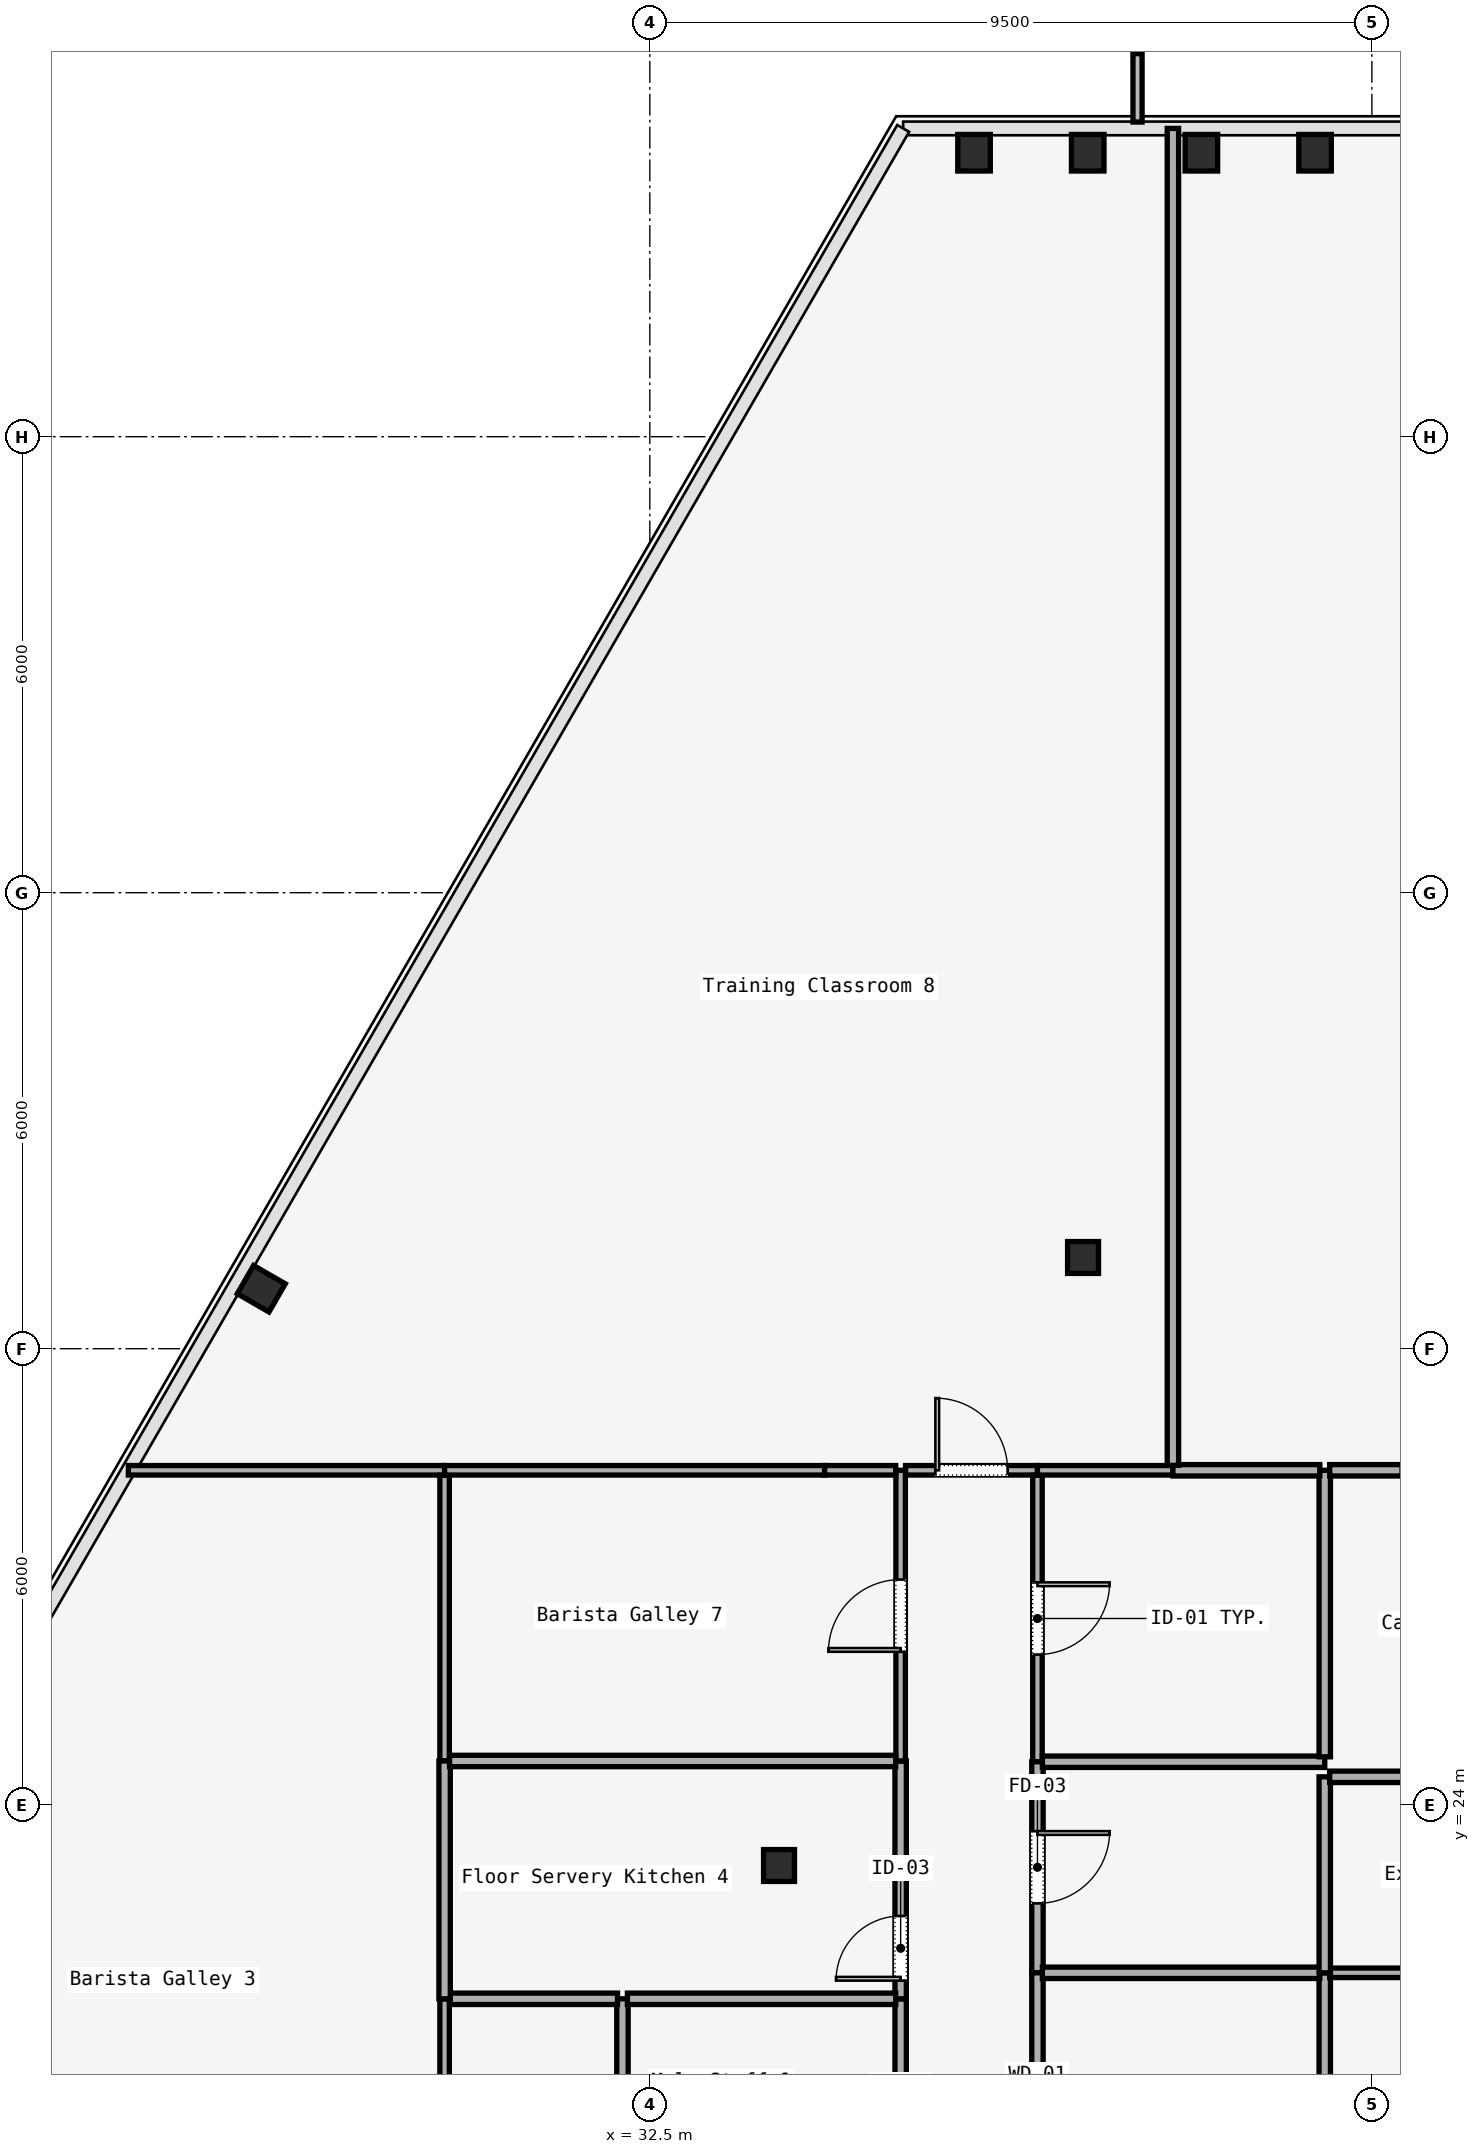
"""IFC4 building model, lengths in metres.
Left out: names, types, materials, properties, quantities, classifications, styles, units other than length and angle.
Written with IfcOpenShell. Run it as: python <this file> out.ifc"""

import sys

from ifc_helpers import new_model, si_unit, direction, frame, frame_2d, origin, origin_2d, place, context, subcontext, project, spatial, rectangle, i_section, extrude, element, fill, save


model = new_model("IFC4")
c1 = context("Model", 3, precision=1e-05, world=origin(), true_north=direction((0.0, 1.0)))
c2 = subcontext(c1, "Body", "Model", "MODEL_VIEW")
j1 = project(units=[si_unit("LENGTHUNIT", "METRE"), si_unit("PLANEANGLEUNIT", "RADIAN")], contexts=[c1])
p1 = place(None, origin())
s1 = spatial("IfcSite", under=j1, at=p1, CompositionType="ELEMENT")
p2 = place(p1, origin())
s2 = spatial("IfcBuilding", under=s1, at=p2, CompositionType="ELEMENT")
p3 = place(p2, frame((0.0, 0.0, 134.6)))
s3 = spatial("IfcBuildingStorey", under=s2, at=p3, CompositionType="ELEMENT", Elevation=134.6)
for number, where, z_axis, x_axis in (
    (1, (34.2, 23.2, 0.0), (0.0, 0.0, 1.0), (1.0, 0.0, 0.0)),
    (2, (38.2, 31.2, 0.0), (0.0, 0.0, 1.0), (1.0, 0.0, 0.0)),
):
    element("IfcColumn", number, at=place(p3, frame(where, z_axis=z_axis, x_axis=x_axis)), inside=s3, PredefinedType="COLUMN", context=c2, shape_type="SweptSolid", body=[
        extrude(i_section(OverallWidth=0.407, OverallDepth=0.419, WebThickness=0.031, FlangeThickness=0.049, FilletRadius=0.015, at=origin_2d()), origin(), (0.0, 0.0, 1.0), 3.58),
    ])
p4 = place(p3, frame((41.252, 45.736, 0.0), z_axis=(0.010023797531, 0.01363781977, 0.999856756418), x_axis=(-0.805764103538, 0.5922366161, 0.0)))
e3 = element("IfcColumn", 3, at=p4, inside=s3, PredefinedType="COLUMN", context=c2, shape_type="SweptSolid", body=[
    extrude(i_section(OverallWidth=0.428, OverallDepth=0.481, WebThickness=0.051, FlangeThickness=0.065, FilletRadius=0.015, at=origin_2d()), origin(), (0.0, 0.0, 1.0), 3.58),
])
p5 = place(p3, frame((39.757, 45.736, 0.0), z_axis=(0.03012741391, 0.013632313987, 0.999453099923), x_axis=(-0.412249348078, 0.911071059253, 0.0)))
e4 = element("IfcColumn", 4, at=p5, inside=s3, PredefinedType="COLUMN", context=c2, shape_type="SweptSolid", body=[
    extrude(i_section(OverallWidth=0.428, OverallDepth=0.481, WebThickness=0.051, FlangeThickness=0.065, FilletRadius=0.015, at=origin_2d()), origin(), (0.0, 0.0, 1.0), 3.582),
])
p6 = place(p3, frame((38.261, 45.736, 0.0), z_axis=(0.050126603366, 0.01362135961, 0.998649979821), x_axis=(-0.262229747612, 0.965005471211, 0.0)))
e5 = element("IfcColumn", 5, at=p6, inside=s3, PredefinedType="COLUMN", context=c2, shape_type="SweptSolid", body=[
    extrude(i_section(OverallWidth=0.428, OverallDepth=0.481, WebThickness=0.051, FlangeThickness=0.065, FilletRadius=0.015, at=origin_2d()), origin(), (0.0, 0.0, 1.0), 3.585),
])
p7 = place(p3, frame((36.766, 45.736, 0.0), z_axis=(0.070065681514, 0.013604986702, 0.997449600035), x_axis=(-0.190614555111, 0.981664958822, 0.0)))
e6 = element("IfcColumn", 6, at=p7, inside=s3, PredefinedType="COLUMN", context=c2, shape_type="SweptSolid", body=[
    extrude(i_section(OverallWidth=0.428, OverallDepth=0.481, WebThickness=0.051, FlangeThickness=0.065, FilletRadius=0.015, at=origin_2d()), origin(), (0.0, 0.0, 1.0), 3.589),
])
p8 = place(p3, frame((27.388, 30.789, 0.0), z_axis=(0.03605116615, -0.062511361682, 0.997392923115), x_axis=(0.001605432576, 0.998044039557, 0.062494141246)))
e7 = element("IfcColumn", 7, at=p8, inside=s3, PredefinedType="COLUMN", context=c2, shape_type="SweptSolid", body=[
    extrude(i_section(OverallWidth=0.428, OverallDepth=0.481, WebThickness=0.051, FlangeThickness=0.065, FilletRadius=0.015, at=origin_2d()), origin(), (0.0, 0.0, 1.0), 3.589),
])
p9 = place(p3, frame((35.8, 17.065, 0.0), z_axis=(0.0, 0.0, 1.0), x_axis=(0.0, 1.0, 0.0)))
e8 = element("IfcWall", 8, at=p9, inside=s3, PredefinedType="PARTITIONING", context=c2, shape_type="SweptSolid", body=[
    extrude(rectangle(XDim=4.381, YDim=0.15, at=frame_2d((2.19, 0.0))), origin(), (0.0, 0.0, 1.0), 3.01),
])
p10 = place(p9, frame((1.74, 0.0, 0.0)))
e9 = element("IfcOpeningElement", 9, at=p10, cuts=e8, PredefinedType="OPENING", context=c2, shape_type="SweptSolid", body=[
    extrude(rectangle(XDim=0.9, YDim=2.15, at=frame_2d((0.45, 1.075))), frame((0.0, 0.075, 0.0), z_axis=(0.0, -1.0, 0.0), x_axis=(1.0, 0.0, 0.0)), (0.0, 0.0, 1.0), 0.15),
])
p11 = place(p3, frame((35.8, 21.446, 0.0), z_axis=(0.0, 0.0, 1.0), x_axis=(0.0, 1.0, 0.0)))
e10 = element("IfcWall", 10, at=p11, inside=s3, PredefinedType="PARTITIONING", context=c2, shape_type="SweptSolid", body=[
    extrude(rectangle(XDim=3.129, YDim=0.15, at=frame_2d((1.564, 0.0))), origin(), (0.0, 0.0, 1.0), 3.01),
])
p12 = place(p11, frame((0.24, 0.0, 0.0)))
e11 = element("IfcOpeningElement", 11, at=p12, cuts=e10, PredefinedType="OPENING", context=c2, shape_type="SweptSolid", body=[
    extrude(rectangle(XDim=0.85, YDim=2.15, at=frame_2d((0.425, 1.075))), frame((0.0, 0.075, 0.0), z_axis=(0.0, -1.0, 0.0), x_axis=(1.0, 0.0, 0.0)), (0.0, 0.0, 1.0), 0.15),
])
p13 = place(p3, frame((35.8, 24.575, 0.0), z_axis=(0.0, 0.0, 1.0), x_axis=(0.0, 1.0, 0.0)))
e12 = element("IfcWall", 12, at=p13, inside=s3, PredefinedType="PARTITIONING", context=c2, shape_type="SweptSolid", body=[
    extrude(rectangle(XDim=3.825, YDim=0.125, at=frame_2d((1.912, 0.0))), origin(), (0.0, 0.0, 1.0), 3.01),
])
p14 = place(p13, frame((1.437, 0.0, 0.0)))
e13 = element("IfcOpeningElement", 13, at=p14, cuts=e12, PredefinedType="OPENING", context=c2, shape_type="SweptSolid", body=[
    extrude(rectangle(XDim=0.95, YDim=2.2, at=frame_2d((0.475, 1.1))), frame((0.0, 0.062, 0.0), z_axis=(0.0, -1.0, 0.0), x_axis=(1.0, 0.0, 0.0)), (0.0, 0.0, 1.0), 0.125),
])
p15 = place(p3, frame((35.865, 28.4, 0.0), z_axis=(0.0, 0.0, 1.0), x_axis=(1.0, 0.0, 0.0)))
e14 = element("IfcWall", 14, at=p15, inside=s3, PredefinedType="PARTITIONING", context=c2, shape_type="SweptSolid", body=[
    extrude(rectangle(XDim=1.735, YDim=0.125, at=frame_2d((0.868, 0.0))), origin(), (0.0, 0.0, 1.0), 3.01),
])
p16 = place(p15, frame((0.393, 0.0, 0.0)))
e15 = element("IfcOpeningElement", 15, at=p16, cuts=e14, PredefinedType="OPENING", context=c2, shape_type="SweptSolid", body=[
    extrude(rectangle(XDim=0.95, YDim=2.2, at=frame_2d((0.475, 1.1))), frame((0.0, 0.062, 0.0), z_axis=(0.0, -1.0, 0.0), x_axis=(1.0, 0.0, 0.0)), (0.0, 0.0, 1.0), 0.125),
])
p17 = place(p3, frame((37.6, 28.335, 0.0), z_axis=(0.0, 0.0, 1.0), x_axis=(0.0, -1.0, 0.0)))
e16 = element("IfcWall", 16, at=p17, inside=s3, PredefinedType="PARTITIONING", context=c2, shape_type="SweptSolid", body=[
    extrude(rectangle(XDim=3.77, YDim=0.125, at=frame_2d((1.885, 0.0))), origin(), (0.0, 0.0, 1.0), 3.01),
])
p18 = place(p17, frame((1.41, 0.0, 0.0)))
e17 = element("IfcOpeningElement", 17, at=p18, cuts=e16, PredefinedType="OPENING", context=c2, shape_type="SweptSolid", body=[
    extrude(rectangle(XDim=0.95, YDim=2.2, at=frame_2d((0.475, 1.1))), frame((0.0, 0.062, 0.0), z_axis=(0.0, -1.0, 0.0), x_axis=(1.0, 0.0, 0.0)), (0.0, 0.0, 1.0), 0.125),
])
p19 = place(p3, frame((37.6, 24.565, 0.0), z_axis=(0.0, 0.0, 1.0), x_axis=(0.0, -1.0, 0.0)))
e18 = element("IfcWall", 18, at=p19, inside=s3, PredefinedType="PARTITIONING", context=c2, shape_type="SweptSolid", body=[
    extrude(rectangle(XDim=2.777, YDim=0.15, at=frame_2d((1.388, 0.0))), origin(), (0.0, 0.0, 1.0), 3.01),
])
p20 = place(p19, frame((0.914, 0.0, 0.0)))
e19 = element("IfcOpeningElement", 19, at=p20, cuts=e18, PredefinedType="OPENING", context=c2, shape_type="SweptSolid", body=[
    extrude(rectangle(XDim=0.95, YDim=2.2, at=frame_2d((0.475, 1.1))), frame((0.0, 0.075, 0.0), z_axis=(0.0, -1.0, 0.0), x_axis=(1.0, 0.0, 0.0)), (0.0, 0.0, 1.0), 0.15),
])
p21 = place(p3, frame((37.6, 21.788, 0.0), z_axis=(0.0, 0.0, 1.0), x_axis=(0.0, -1.0, 0.0)))
e20 = element("IfcWall", 20, at=p21, inside=s3, PredefinedType="PARTITIONING", context=c2, shape_type="SweptSolid", body=[
    extrude(rectangle(XDim=4.788, YDim=0.15, at=frame_2d((2.394, 0.0))), origin(), (0.0, 0.0, 1.0), 3.01),
])
p22 = place(p21, frame((1.944, 0.0, 0.0)))
e21 = element("IfcOpeningElement", 21, at=p22, cuts=e20, PredefinedType="OPENING", context=c2, shape_type="SweptSolid", body=[
    extrude(rectangle(XDim=0.9, YDim=2.15, at=frame_2d((0.45, 1.075))), frame((0.0, 0.075, 0.0), z_axis=(0.0, -1.0, 0.0), x_axis=(1.0, 0.0, 0.0)), (0.0, 0.0, 1.0), 0.15),
])
p23 = place(p3, frame((32.14, 21.446, 0.0), z_axis=(0.0, 0.0, 1.0), x_axis=(0.0, -1.0, 0.0)))
e22 = element("IfcWall", 22, at=p23, inside=s3, PredefinedType="PARTITIONING", context=c2, shape_type="SweptSolid", body=[
    extrude(rectangle(XDim=4.381, YDim=0.15, at=frame_2d((2.19, 0.0))), origin(), (0.0, 0.0, 1.0), 3.01),
])
p24 = place(p3, frame((29.8, 17.065, 0.0), z_axis=(0.0, 0.0, 1.0), x_axis=(0.0, 1.0, 0.0)))
e23 = element("IfcWall", 23, at=p24, inside=s3, PredefinedType="PARTITIONING", context=c2, shape_type="SweptSolid", body=[
    extrude(rectangle(XDim=4.381, YDim=0.125, at=frame_2d((2.19, 0.0))), origin(), (0.0, 0.0, 1.0), 3.01),
])
p25 = place(p3, frame((29.865, 21.446, 0.0), z_axis=(0.0, 0.0, 1.0), x_axis=(1.0, 0.0, 0.0)))
e24 = element("IfcWall", 24, at=p25, inside=s3, PredefinedType="PARTITIONING", context=c2, shape_type="SweptSolid", body=[
    extrude(rectangle(XDim=2.21, YDim=0.15, at=frame_2d((1.105, 0.0))), origin(), (0.0, 0.0, 1.0), 3.01),
])
p26 = place(p3, frame((32.205, 21.446, 0.0), z_axis=(0.0, 0.0, 1.0), x_axis=(1.0, 0.0, 0.0)))
e25 = element("IfcWall", 25, at=p26, inside=s3, PredefinedType="PARTITIONING", context=c2, shape_type="SweptSolid", body=[
    extrude(rectangle(XDim=3.53, YDim=0.15, at=frame_2d((1.765, 0.0))), origin(), (0.0, 0.0, 1.0), 3.01),
])
p27 = place(p3, frame((41.38, 21.788, 0.0), z_axis=(0.0, 0.0, 1.0), x_axis=(0.0, -1.0, 0.0)))
e26 = element("IfcWall", 26, at=p27, inside=s3, PredefinedType="PARTITIONING", context=c2, shape_type="SweptSolid", body=[
    extrude(rectangle(XDim=4.723, YDim=0.15, at=frame_2d((2.362, 0.0))), origin(), (0.0, 0.0, 1.0), 3.01),
])
p28 = place(p3, frame((37.665, 21.788, 0.0), z_axis=(0.0, 0.0, 1.0), x_axis=(1.0, 0.0, 0.0)))
e27 = element("IfcWall", 27, at=p28, inside=s3, PredefinedType="PARTITIONING", context=c2, shape_type="SweptSolid", body=[
    extrude(rectangle(XDim=3.65, YDim=0.15, at=frame_2d((1.825, 0.0))), origin(), (0.0, 0.0, 1.0), 3.01),
])
p29 = place(p3, frame((41.445, 21.788, 0.0), z_axis=(0.0, 0.0, 1.0), x_axis=(1.0, 0.0, 0.0)))
e28 = element("IfcWall", 28, at=p29, inside=s3, PredefinedType="PARTITIONING", context=c2, shape_type="SweptSolid", body=[
    extrude(rectangle(XDim=2.284, YDim=0.125, at=frame_2d((1.142, 0.0))), origin(), (0.0, 0.0, 1.0), 3.01),
])
p30 = place(p3, frame((25.639, 28.4, 0.0), z_axis=(0.0, 0.0, 1.0), x_axis=(1.0, 0.0, 0.0)))
e29 = element("IfcWall", 29, at=p30, inside=s3, PredefinedType="PARTITIONING", context=c2, shape_type="SweptSolid", body=[
    extrude(rectangle(XDim=4.161, YDim=0.125, at=frame_2d((2.08, 0.0))), origin(), (0.0, 0.0, 1.0), 3.01),
])
p31 = place(p3, frame((29.8, 28.335, 0.0), z_axis=(0.0, 0.0, 1.0), x_axis=(0.0, -1.0, 0.0)))
e30 = element("IfcWall", 30, at=p31, inside=s3, PredefinedType="PARTITIONING", context=c2, shape_type="SweptSolid", body=[
    extrude(rectangle(XDim=3.76, YDim=0.125, at=frame_2d((1.88, 0.0))), origin(), (0.0, 0.0, 1.0), 3.01),
])
p32 = place(p3, frame((29.8, 24.575, 0.0), z_axis=(0.0, 0.0, 1.0), x_axis=(0.0, -1.0, 0.0)))
e31 = element("IfcWall", 31, at=p32, inside=s3, PredefinedType="PARTITIONING", context=c2, shape_type="SweptSolid", body=[
    extrude(rectangle(XDim=3.129, YDim=0.15, at=frame_2d((1.564, 0.0))), origin(), (0.0, 0.0, 1.0), 3.01),
])
p33 = place(p3, frame((29.865, 24.575, 0.0), z_axis=(0.0, 0.0, 1.0), x_axis=(1.0, 0.0, 0.0)))
e32 = element("IfcWall", 32, at=p33, inside=s3, PredefinedType="PARTITIONING", context=c2, shape_type="SweptSolid", body=[
    extrude(rectangle(XDim=5.87, YDim=0.15, at=frame_2d((2.935, 0.0))), origin(), (0.0, 0.0, 1.0), 3.01),
])
p34 = place(p3, frame((41.38, 21.788, 0.0), z_axis=(0.0, 0.0, 1.0), x_axis=(0.0, 1.0, 0.0)))
e33 = element("IfcWall", 33, at=p34, inside=s3, PredefinedType="PARTITIONING", context=c2, shape_type="SweptSolid", body=[
    extrude(rectangle(XDim=2.579, YDim=0.15, at=frame_2d((1.289, 0.0))), origin(), (0.0, 0.0, 1.0), 3.01),
])
p35 = place(p3, frame((41.445, 24.367, 0.0), z_axis=(0.0, 0.0, 1.0), x_axis=(1.0, 0.0, 0.0)))
e34 = element("IfcWall", 34, at=p35, inside=s3, PredefinedType="PARTITIONING", context=c2, shape_type="SweptSolid", body=[
    extrude(rectangle(XDim=5.09, YDim=0.15, at=frame_2d((2.545, 0.0))), origin(), (0.0, 0.0, 1.0), 3.01),
])
p36 = place(p3, frame((37.665, 24.565, 0.0), z_axis=(0.0, 0.0, 1.0), x_axis=(1.0, 0.0, 0.0)))
e35 = element("IfcWall", 35, at=p36, inside=s3, PredefinedType="PARTITIONING", context=c2, shape_type="SweptSolid", body=[
    extrude(rectangle(XDim=3.715, YDim=0.15, at=frame_2d((1.857, 0.0))), origin(), (0.0, 0.0, 1.0), 3.01),
])
p37 = place(p3, frame((41.38, 24.63, 0.0), z_axis=(0.0, 0.0, 1.0), x_axis=(0.0, 1.0, 0.0)))
e36 = element("IfcWall", 36, at=p37, inside=s3, PredefinedType="PARTITIONING", context=c2, shape_type="SweptSolid", body=[
    extrude(rectangle(XDim=3.77, YDim=0.15, at=frame_2d((1.885, 0.0))), origin(), (0.0, 0.0, 1.0), 3.01),
])
p38 = place(p3, frame((41.445, 28.4, 0.0), z_axis=(0.0, 0.0, 1.0), x_axis=(1.0, 0.0, 0.0)))
e37 = element("IfcWall", 37, at=p38, inside=s3, PredefinedType="PARTITIONING", context=c2, shape_type="SweptSolid", body=[
    extrude(rectangle(XDim=0.955, YDim=0.15, at=frame_2d((0.478, 0.0))), origin(), (0.0, 0.0, 1.0), 3.01),
])
p39 = place(p3, frame((37.6, 28.4, 0.0), z_axis=(0.0, 0.0, 1.0), x_axis=(1.0, 0.0, 0.0)))
e38 = element("IfcWall", 38, at=p39, inside=s3, PredefinedType="PARTITIONING", context=c2, shape_type="SweptSolid", body=[
    extrude(rectangle(XDim=1.782, YDim=0.125, at=frame_2d((0.891, 0.0))), origin(), (0.0, 0.0, 1.0), 3.01),
])
p40 = place(p3, frame((39.382, 28.4, 0.0), z_axis=(0.0, 0.0, 1.0), x_axis=(1.0, 0.0, 0.0)))
e39 = element("IfcWall", 39, at=p40, inside=s3, PredefinedType="PARTITIONING", context=c2, shape_type="SweptSolid", body=[
    extrude(rectangle(XDim=1.933, YDim=0.15, at=frame_2d((0.966, 0.0))), origin(), (0.0, 0.0, 1.0), 3.01),
])
p41 = place(p3, frame((29.8, 28.4, 0.0), z_axis=(0.0, 0.0, 1.0), x_axis=(1.0, 0.0, 0.0)))
e40 = element("IfcWall", 40, at=p41, inside=s3, PredefinedType="PARTITIONING", context=c2, shape_type="SweptSolid", body=[
    extrude(rectangle(XDim=5.0, YDim=0.125, at=frame_2d((2.5, 0.0))), origin(), (0.0, 0.0, 1.0), 3.01),
])
p42 = place(p3, frame((34.8, 28.4, 0.0), z_axis=(0.0, 0.0, 1.0), x_axis=(1.0, 0.0, 0.0)))
e41 = element("IfcWall", 41, at=p42, inside=s3, PredefinedType="PARTITIONING", context=c2, shape_type="SweptSolid", body=[
    extrude(rectangle(XDim=0.935, YDim=0.125, at=frame_2d((0.468, 0.0))), origin(), (0.0, 0.0, 1.0), 3.01),
])
p43 = place(p3, frame((39.382, 46.056, 0.0), z_axis=(0.0, 0.0, 1.0), x_axis=(0.0, -1.0, 0.0)))
e42 = element("IfcWall", 42, at=p43, inside=s3, PredefinedType="PARTITIONING", context=c2, shape_type="SweptSolid", body=[
    extrude(rectangle(XDim=17.591, YDim=0.15, at=frame_2d((8.795, 0.0))), origin(), (0.0, 0.0, 1.0), 3.01),
])
p44 = place(p12, origin())
e43 = element("IfcDoor", 43, at=p44, inside=s3, OperationType="SINGLE_SWING_LEFT", PredefinedType="DOOR", context=c2, shape_type="SweptSolid", body=[
    extrude(rectangle(XDim=0.85, YDim=2.15, at=frame_2d((0.425, 1.075))), frame((0.0, 0.025, 0.0), z_axis=(0.0, -1.0, 0.0), x_axis=(1.0, 0.0, 0.0)), (0.0, 0.0, 1.0), 0.05),
])
fill(e11, e43)
p45 = place(p20, origin())
e44 = element("IfcDoor", 44, at=p45, inside=s3, OperationType="SINGLE_SWING_LEFT", PredefinedType="DOOR", context=c2, shape_type="SweptSolid", body=[
    extrude(rectangle(XDim=0.95, YDim=2.2, at=frame_2d((0.475, 1.1))), frame((0.0, 0.025, 0.0), z_axis=(0.0, -1.0, 0.0), x_axis=(1.0, 0.0, 0.0)), (0.0, 0.0, 1.0), 0.05),
])
fill(e19, e44)
p46 = place(p18, origin())
e45 = element("IfcDoor", 45, at=p46, inside=s3, OperationType="SINGLE_SWING_RIGHT", PredefinedType="DOOR", context=c2, shape_type="SweptSolid", body=[
    extrude(rectangle(XDim=0.95, YDim=2.2, at=frame_2d((0.475, 1.1))), frame((0.0, 0.025, 0.0), z_axis=(0.0, -1.0, 0.0), x_axis=(1.0, 0.0, 0.0)), (0.0, 0.0, 1.0), 0.05),
])
fill(e17, e45)
p47 = place(p14, origin())
e46 = element("IfcDoor", 46, at=p47, inside=s3, OperationType="SINGLE_SWING_LEFT", PredefinedType="DOOR", context=c2, shape_type="SweptSolid", body=[
    extrude(rectangle(XDim=0.95, YDim=2.2, at=frame_2d((0.475, 1.1))), frame((0.0, 0.025, 0.0), z_axis=(0.0, -1.0, 0.0), x_axis=(1.0, 0.0, 0.0)), (0.0, 0.0, 1.0), 0.05),
])
fill(e13, e46)
p48 = place(p16, origin())
e47 = element("IfcDoor", 47, at=p48, inside=s3, OperationType="SINGLE_SWING_RIGHT", PredefinedType="DOOR", context=c2, shape_type="SweptSolid", body=[
    extrude(rectangle(XDim=0.95, YDim=2.2, at=frame_2d((0.475, 1.1))), frame((0.0, 0.025, 0.0), z_axis=(0.0, -1.0, 0.0), x_axis=(1.0, 0.0, 0.0)), (0.0, 0.0, 1.0), 0.05),
])
fill(e15, e47)
save(model, sys.argv[1])
